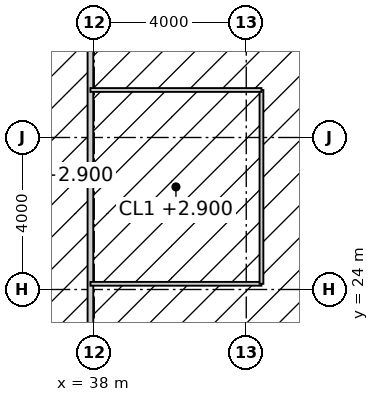
"""IFC4 building model, lengths in metres.
Left out: names, types, materials, properties, quantities, classifications, styles, units other than length and angle.
Written with IfcOpenShell. Run it as: python <this file> out.ifc"""

import sys

from ifc_helpers import new_model, si_unit, direction, frame, frame_2d, origin, place, context, subcontext, project, spatial, rectangle, extrude, element, fill, save


model = new_model("IFC4")
c1 = context("Model", 3, precision=1e-05, world=origin(), true_north=direction((0.0, 1.0)))
c2 = subcontext(c1, "Body", "Model", "MODEL_VIEW")
j1 = project(units=[si_unit("LENGTHUNIT", "METRE"), si_unit("PLANEANGLEUNIT", "RADIAN")], contexts=[c1])
p1 = place(None, origin())
s1 = spatial("IfcSite", under=j1, at=p1, CompositionType="ELEMENT")
p2 = place(p1, origin())
s2 = spatial("IfcBuilding", under=s1, at=p2, CompositionType="ELEMENT")
p3 = place(p2, frame((0.0, 0.0, 187.8)))
s3 = spatial("IfcBuildingStorey", under=s2, at=p3, CompositionType="ELEMENT", Elevation=187.8)
p4 = place(p3, frame((37.9, 15.025, 0.0), z_axis=(0.0, 0.0, 1.0), x_axis=(0.0, 1.0, 0.0)))
e1 = element("IfcWall", 1, at=p4, inside=s3, PredefinedType="PARTITIONING", context=c2, shape_type="SweptSolid", body=[
    extrude(rectangle(XDim=23.35, YDim=0.15, at=frame_2d((11.675, 0.0))), origin(), (0.0, 0.0, 1.0), 2.95),
])
p5 = place(p4, frame((10.775, 0.0, 0.0)))
e2 = element("IfcOpeningElement", 2, at=p5, cuts=e1, PredefinedType="OPENING", context=c2, shape_type="SweptSolid", body=[
    extrude(rectangle(XDim=1.8, YDim=2.4, at=frame_2d((0.9, 1.2))), frame((0.0, 0.085, 0.0), z_axis=(0.0, -1.0, 0.0), x_axis=(1.0, 0.0, 0.0)), (0.0, 0.0, 1.0), 0.17),
])
p6 = place(p3, frame((37.9, 24.15, 0.0), z_axis=(0.0, 0.0, 1.0), x_axis=(1.0, 0.0, 0.0)))
e3 = element("IfcWall", 3, at=p6, inside=s3, PredefinedType="PARTITIONING", context=c2, shape_type="SweptSolid", body=[
    extrude(rectangle(XDim=4.5, YDim=0.1, at=frame_2d((2.25, 0.0))), origin(), (0.0, 0.0, 1.0), 2.95),
])
p7 = place(p3, frame((42.4, 24.15, 0.0), z_axis=(0.0, 0.0, 1.0), x_axis=(0.0, 1.0, 0.0)))
e4 = element("IfcWall", 4, at=p7, inside=s3, PredefinedType="PARTITIONING", context=c2, shape_type="SweptSolid", body=[
    extrude(rectangle(XDim=5.1, YDim=0.1, at=frame_2d((2.55, 0.0))), origin(), (0.0, 0.0, 1.0), 3.85),
])
p8 = place(p7, frame((2.05, 0.0, 0.0)))
e5 = element("IfcOpeningElement", 5, at=p8, cuts=e4, PredefinedType="OPENING", context=c2, shape_type="SweptSolid", body=[
    extrude(rectangle(XDim=1.0, YDim=2.2, at=frame_2d((0.5, 1.1))), frame((0.0, 0.06, 0.0), z_axis=(0.0, -1.0, 0.0), x_axis=(1.0, 0.0, 0.0)), (0.0, 0.0, 1.0), 0.12),
])
p9 = place(p3, frame((42.4, 29.25, 0.0), z_axis=(0.0, 0.0, 1.0), x_axis=(-1.0, 0.0, 0.0)))
e6 = element("IfcWall", 6, at=p9, inside=s3, PredefinedType="PARTITIONING", context=c2, shape_type="SweptSolid", body=[
    extrude(rectangle(XDim=4.5, YDim=0.1, at=frame_2d((2.25, 0.0))), origin(), (0.0, 0.0, 1.0), 3.85),
])
p10 = place(p5, origin())
e7 = element("IfcDoor", 7, at=p10, inside=s3, OperationType="DOUBLE_DOOR_DOUBLE_SWING", PredefinedType="DOOR", context=c2, shape_type="SweptSolid", body=[
    extrude(rectangle(XDim=1.8, YDim=2.4, at=frame_2d((0.9, 1.2))), frame((0.0, 0.025, 0.0), z_axis=(0.0, -1.0, 0.0), x_axis=(1.0, 0.0, 0.0)), (0.0, 0.0, 1.0), 0.05),
])
fill(e2, e7)
p11 = place(p8, origin())
e8 = element("IfcDoor", 8, at=p11, inside=s3, OperationType="SINGLE_SWING_RIGHT", PredefinedType="DOOR", context=c2, shape_type="SweptSolid", body=[
    extrude(rectangle(XDim=1.0, YDim=2.2, at=frame_2d((0.5, 1.1))), frame((0.0, 0.025, 0.0), z_axis=(0.0, -1.0, 0.0), x_axis=(1.0, 0.0, 0.0)), (0.0, 0.0, 1.0), 0.05),
])
fill(e5, e8)
save(model, sys.argv[1])
